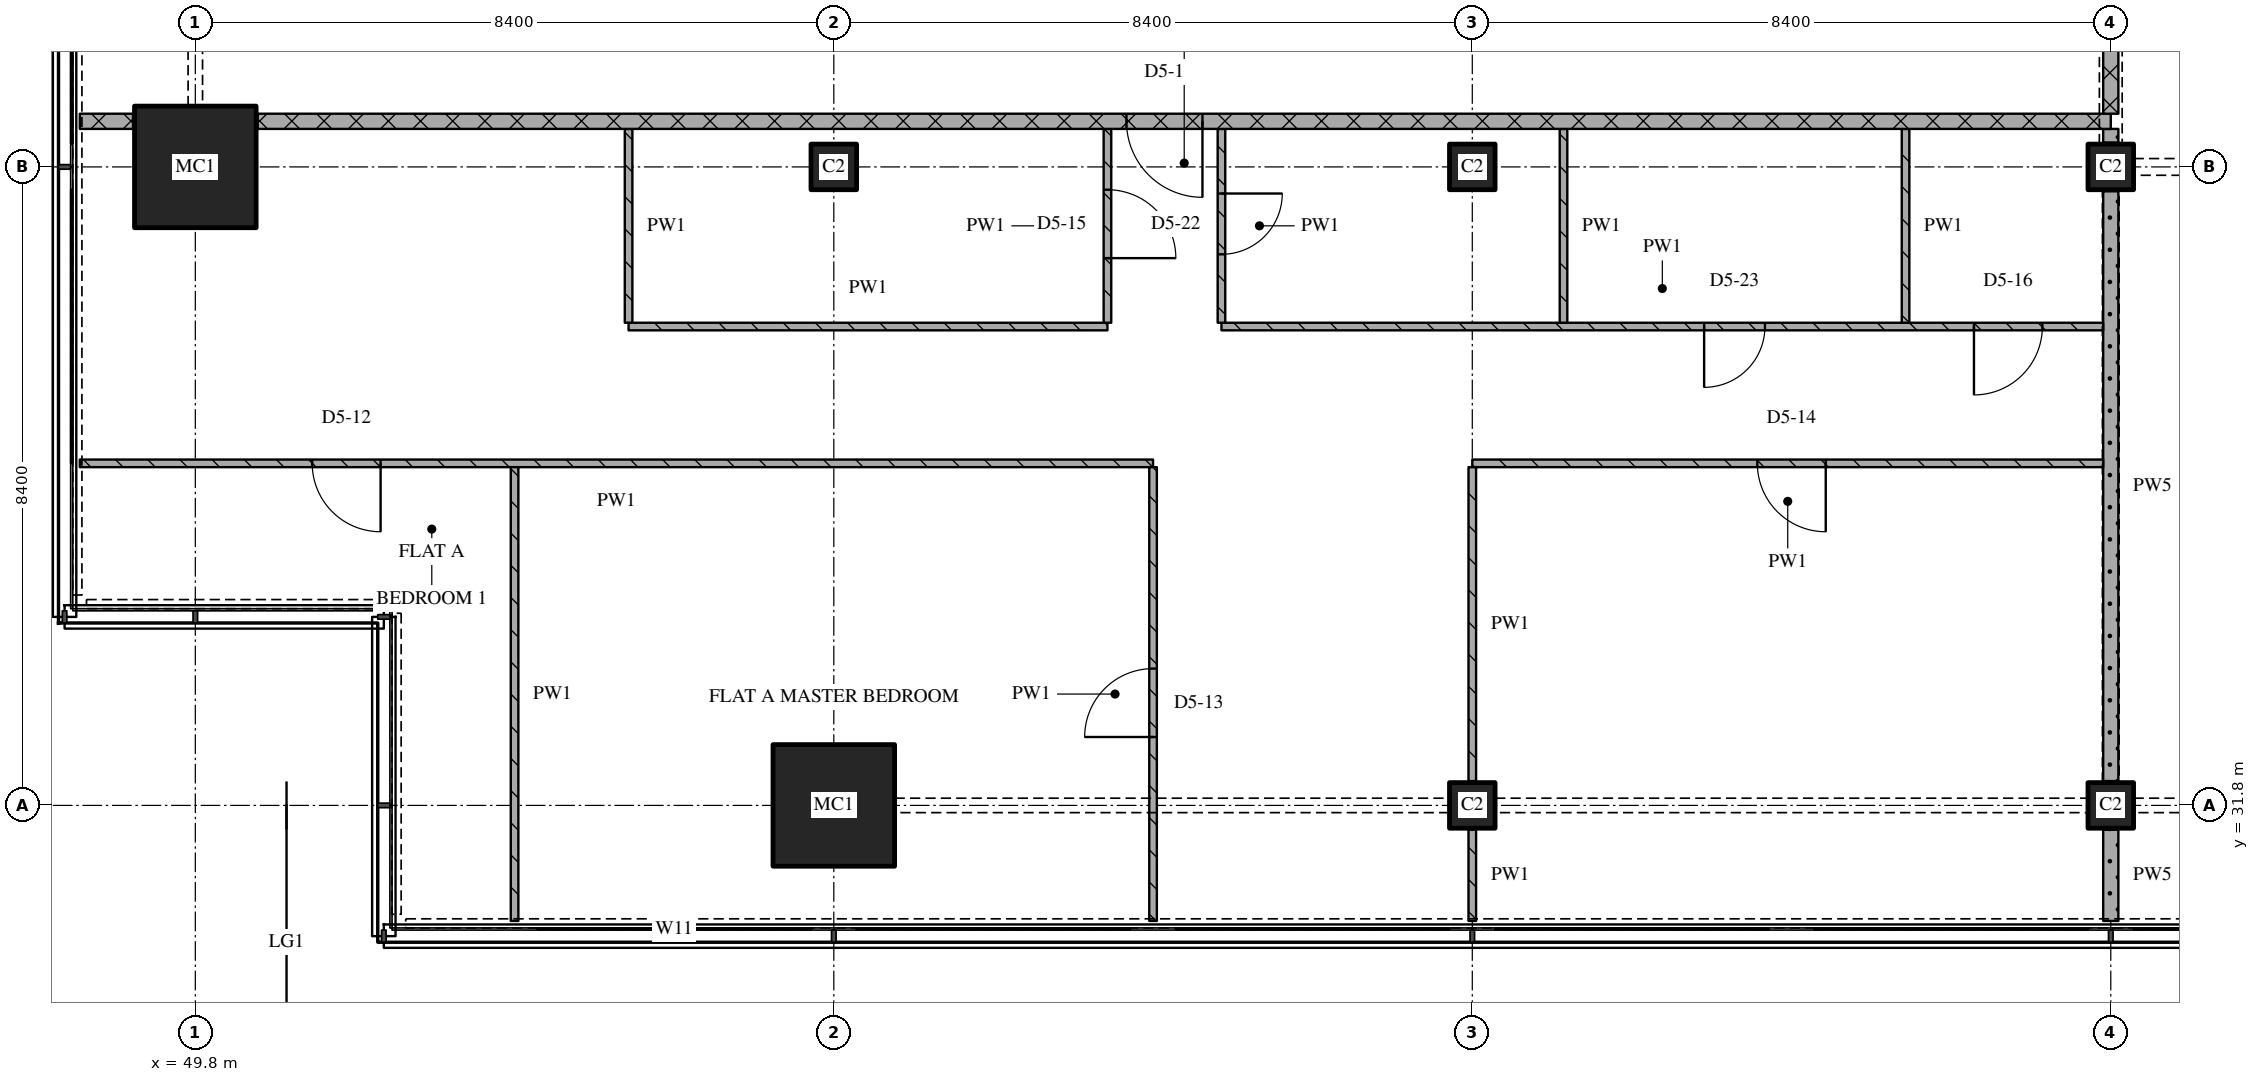
"""IFC4 building model, lengths in metres.
Left out: names, types, materials, properties, quantities, classifications, styles, units other than length and angle.
Written with IfcOpenShell. Run it as: python <this file> out.ifc"""

import sys

from ifc_helpers import new_model, si_unit, direction, frame, frame_2d, origin, origin_2d, place, context, subcontext, project, spatial, rectangle, extrude, element, fill, save


model = new_model("IFC4")
c1 = context("Model", 3, precision=1e-05, world=origin(), true_north=direction((0.0, 1.0)))
c2 = subcontext(c1, "Body", "Model", "MODEL_VIEW")
j1 = project(units=[si_unit("LENGTHUNIT", "METRE"), si_unit("PLANEANGLEUNIT", "RADIAN")], contexts=[c1])
p1 = place(None, origin())
s1 = spatial("IfcSite", under=j1, at=p1, CompositionType="ELEMENT")
p2 = place(p1, origin())
s2 = spatial("IfcBuilding", under=s1, at=p2, CompositionType="ELEMENT")
p3 = place(p2, frame((0.0, 0.0, 248.7)))
s3 = spatial("IfcBuildingStorey", under=s2, at=p3, CompositionType="ELEMENT", Elevation=248.7)
for number, where, z_axis, x_axis in (
    (1, (49.8, 40.2, 0.0), (0.0, 0.0, 1.0), (1.0, 0.0, 0.0)),
    (2, (58.2, 31.8, 0.0), (0.0, 0.0, 1.0), (1.0, 0.0, 0.0)),
):
    element("IfcColumn", number, at=place(p3, frame(where, z_axis=z_axis, x_axis=x_axis)), inside=s3, PredefinedType="COLUMN", context=c2, shape_type="SweptSolid", body=[
        extrude(rectangle(XDim=1.6, YDim=1.6, at=origin_2d()), origin(), (0.0, 0.0, 1.0), 3.6),
    ])
for number, where, z_axis, x_axis in (
    (3, (58.2, 40.2, 0.0), (0.0, 0.0, 1.0), (1.0, 0.0, 0.0)),
    (4, (66.6, 31.8, 0.0), (0.0, 0.0, 1.0), (1.0, 0.0, 0.0)),
    (5, (66.6, 40.2, 0.0), (0.0, 0.0, 1.0), (1.0, 0.0, 0.0)),
    (6, (75.0, 31.8, 0.0), (0.0, 0.0, 1.0), (1.0, 0.0, 0.0)),
    (7, (75.0, 40.2, 0.0), (0.0, 0.0, 1.0), (1.0, 0.0, 0.0)),
):
    element("IfcColumn", number, at=place(p3, frame(where, z_axis=z_axis, x_axis=x_axis)), inside=s3, PredefinedType="COLUMN", context=c2, shape_type="SweptSolid", body=[
        extrude(rectangle(XDim=0.6, YDim=0.6, at=origin_2d()), origin(), (0.0, 0.0, 1.0), 3.6),
    ])
p4 = place(p3, frame((62.4, 36.3, 0.0), z_axis=(0.0, 0.0, 1.0), x_axis=(-1.0, 0.0, 0.0)))
e8 = element("IfcWall", 8, at=p4, inside=s3, PredefinedType="PARTITIONING", context=c2, shape_type="SweptSolid", body=[
    extrude(rectangle(XDim=14.12, YDim=0.1, at=frame_2d((7.06, 0.0))), origin(), (0.0, 0.0, 1.0), 3.3),
])
p5 = place(p4, frame((10.163, 0.0, 0.0)))
e9 = element("IfcOpeningElement", 9, at=p5, cuts=e8, PredefinedType="OPENING", context=c2, shape_type="SweptSolid", body=[
    extrude(rectangle(XDim=0.9, YDim=2.1, at=frame_2d((0.45, 1.05))), frame((0.0, 0.06, 0.0), z_axis=(0.0, -1.0, 0.0), x_axis=(1.0, 0.0, 0.0)), (0.0, 0.0, 1.0), 0.12),
])
p6 = place(p3, frame((74.9, 36.3, 0.0), z_axis=(0.0, 0.0, 1.0), x_axis=(-1.0, 0.0, 0.0)))
e10 = element("IfcWall", 10, at=p6, inside=s3, PredefinedType="PARTITIONING", context=c2, shape_type="SweptSolid", body=[
    extrude(rectangle(XDim=8.3, YDim=0.1, at=frame_2d((4.15, 0.0))), origin(), (0.0, 0.0, 1.0), 3.3),
])
p7 = place(p6, frame((3.65, 0.0, 0.0)))
e11 = element("IfcOpeningElement", 11, at=p7, cuts=e10, PredefinedType="OPENING", context=c2, shape_type="SweptSolid", body=[
    extrude(rectangle(XDim=0.9, YDim=2.1, at=frame_2d((0.45, 1.05))), frame((0.0, 0.06, 0.0), z_axis=(0.0, -1.0, 0.0), x_axis=(1.0, 0.0, 0.0)), (0.0, 0.0, 1.0), 0.12),
])
p8 = place(p3, frame((55.5, 38.1, 0.0), z_axis=(0.0, 0.0, 1.0), x_axis=(1.0, 0.0, 0.0)))
e12 = element("IfcWall", 12, at=p8, inside=s3, PredefinedType="PARTITIONING", context=c2, shape_type="SweptSolid", body=[
    extrude(rectangle(XDim=6.3, YDim=0.1, at=frame_2d((3.15, 0.0))), origin(), (0.0, 0.0, 1.0), 3.3),
])
p9 = place(p3, frame((63.3, 38.1, 0.0), z_axis=(0.0, 0.0, 1.0), x_axis=(1.0, 0.0, 0.0)))
e13 = element("IfcWall", 13, at=p9, inside=s3, PredefinedType="PARTITIONING", context=c2, shape_type="SweptSolid", body=[
    extrude(rectangle(XDim=11.6, YDim=0.1, at=frame_2d((5.8, 0.0))), origin(), (0.0, 0.0, 1.0), 3.3),
])
p10 = place(p9, frame((6.35, 0.0, 0.0)))
e14 = element("IfcOpeningElement", 14, at=p10, cuts=e13, PredefinedType="OPENING", context=c2, shape_type="SweptSolid", body=[
    extrude(rectangle(XDim=0.8, YDim=2.1, at=frame_2d((0.4, 1.05))), frame((0.0, 0.06, 0.0), z_axis=(0.0, -1.0, 0.0), x_axis=(1.0, 0.0, 0.0)), (0.0, 0.0, 1.0), 0.12),
])
p11 = place(p9, frame((9.9, 0.0, 0.0)))
e15 = element("IfcOpeningElement", 15, at=p11, cuts=e13, PredefinedType="OPENING", context=c2, shape_type="SweptSolid", body=[
    extrude(rectangle(XDim=0.9, YDim=2.1, at=frame_2d((0.45, 1.05))), frame((0.0, 0.06, 0.0), z_axis=(0.0, -1.0, 0.0), x_axis=(1.0, 0.0, 0.0)), (0.0, 0.0, 1.0), 0.12),
])
p12 = place(p3, frame((48.28, 40.8, 0.0), z_axis=(0.0, 0.0, 1.0), x_axis=(1.0, 0.0, 0.0)))
e16 = element("IfcWall", 16, at=p12, inside=s3, PredefinedType="PARTITIONING", context=c2, shape_type="SweptSolid", body=[
    extrude(rectangle(XDim=0.7, YDim=0.2, at=frame_2d((0.35, 0.0))), origin(), (0.0, 0.0, 1.0), 3.3),
])
p13 = place(p3, frame((75.0, 40.8, 0.0), z_axis=(0.0, 0.0, 1.0), x_axis=(-1.0, 0.0, 0.0)))
e17 = element("IfcWall", 17, at=p13, inside=s3, PredefinedType="PARTITIONING", context=c2, shape_type="SweptSolid", body=[
    extrude(rectangle(XDim=24.38, YDim=0.2, at=frame_2d((12.19, 0.0))), origin(), (0.0, 0.0, 1.0), 3.3),
])
p14 = place(p13, frame((11.95, 0.0, 0.0)))
e18 = element("IfcOpeningElement", 18, at=p14, cuts=e17, PredefinedType="OPENING", context=c2, shape_type="SweptSolid", body=[
    extrude(rectangle(XDim=1.0, YDim=2.1, at=frame_2d((0.5, 1.05))), frame((0.0, 0.11, 0.0), z_axis=(0.0, -1.0, 0.0), x_axis=(1.0, 0.0, 0.0)), (0.0, 0.0, 1.0), 0.22),
])
p15 = place(p3, frame((54.0, 36.25, 0.0), z_axis=(0.0, 0.0, 1.0), x_axis=(0.0, -1.0, 0.0)))
e19 = element("IfcWall", 19, at=p15, inside=s3, PredefinedType="PARTITIONING", context=c2, shape_type="SweptSolid", body=[
    extrude(rectangle(XDim=5.97, YDim=0.1, at=frame_2d((2.985, 0.0))), origin(), (0.0, 0.0, 1.0), 3.3),
])
p16 = place(p3, frame((55.5, 40.7, 0.0), z_axis=(0.0, 0.0, 1.0), x_axis=(0.0, -1.0, 0.0)))
e20 = element("IfcWall", 20, at=p16, inside=s3, PredefinedType="PARTITIONING", context=c2, shape_type="SweptSolid", body=[
    extrude(rectangle(XDim=2.55, YDim=0.1, at=frame_2d((1.275, 0.0))), origin(), (0.0, 0.0, 1.0), 3.3),
])
p17 = place(p3, frame((61.8, 38.15, 0.0), z_axis=(0.0, 0.0, 1.0), x_axis=(0.0, 1.0, 0.0)))
e21 = element("IfcWall", 21, at=p17, inside=s3, PredefinedType="PARTITIONING", context=c2, shape_type="SweptSolid", body=[
    extrude(rectangle(XDim=2.55, YDim=0.1, at=frame_2d((1.275, 0.0))), origin(), (0.0, 0.0, 1.0), 3.3),
])
p18 = place(p17, frame((0.85, 0.0, 0.0)))
e22 = element("IfcOpeningElement", 22, at=p18, cuts=e21, PredefinedType="OPENING", context=c2, shape_type="SweptSolid", body=[
    extrude(rectangle(XDim=0.9, YDim=2.1, at=frame_2d((0.45, 1.05))), frame((0.0, 0.06, 0.0), z_axis=(0.0, -1.0, 0.0), x_axis=(1.0, 0.0, 0.0)), (0.0, 0.0, 1.0), 0.12),
])
p19 = place(p3, frame((62.4, 30.28, 0.0), z_axis=(0.0, 0.0, 1.0), x_axis=(0.0, 1.0, 0.0)))
e23 = element("IfcWall", 23, at=p19, inside=s3, PredefinedType="PARTITIONING", context=c2, shape_type="SweptSolid", body=[
    extrude(rectangle(XDim=5.97, YDim=0.1, at=frame_2d((2.985, 0.0))), origin(), (0.0, 0.0, 1.0), 3.3),
])
p20 = place(p19, frame((2.42, 0.0, 0.0)))
e24 = element("IfcOpeningElement", 24, at=p20, cuts=e23, PredefinedType="OPENING", context=c2, shape_type="SweptSolid", body=[
    extrude(rectangle(XDim=0.9, YDim=2.1, at=frame_2d((0.45, 1.05))), frame((0.0, 0.06, 0.0), z_axis=(0.0, -1.0, 0.0), x_axis=(1.0, 0.0, 0.0)), (0.0, 0.0, 1.0), 0.12),
])
p21 = place(p3, frame((63.3, 40.7, 0.0), z_axis=(0.0, 0.0, 1.0), x_axis=(0.0, -1.0, 0.0)))
e25 = element("IfcWall", 25, at=p21, inside=s3, PredefinedType="PARTITIONING", context=c2, shape_type="SweptSolid", body=[
    extrude(rectangle(XDim=2.55, YDim=0.1, at=frame_2d((1.275, 0.0))), origin(), (0.0, 0.0, 1.0), 3.3),
])
p22 = place(p21, frame((0.85, 0.0, 0.0)))
e26 = element("IfcOpeningElement", 26, at=p22, cuts=e25, PredefinedType="OPENING", context=c2, shape_type="SweptSolid", body=[
    extrude(rectangle(XDim=0.8, YDim=2.1, at=frame_2d((0.4, 1.05))), frame((0.0, 0.06, 0.0), z_axis=(0.0, -1.0, 0.0), x_axis=(1.0, 0.0, 0.0)), (0.0, 0.0, 1.0), 0.12),
])
p23 = place(p3, frame((66.6, 31.48, 0.0), z_axis=(0.0, 0.0, 1.0), x_axis=(0.0, -1.0, 0.0)))
e27 = element("IfcWall", 27, at=p23, inside=s3, PredefinedType="PARTITIONING", context=c2, shape_type="SweptSolid", body=[
    extrude(rectangle(XDim=1.2, YDim=0.1, at=frame_2d((0.6, 0.0))), origin(), (0.0, 0.0, 1.0), 3.3),
])
p24 = place(p3, frame((66.6, 36.25, 0.0), z_axis=(0.0, 0.0, 1.0), x_axis=(0.0, -1.0, 0.0)))
e28 = element("IfcWall", 28, at=p24, inside=s3, PredefinedType="PARTITIONING", context=c2, shape_type="SweptSolid", body=[
    extrude(rectangle(XDim=4.13, YDim=0.1, at=frame_2d((2.065, 0.0))), origin(), (0.0, 0.0, 1.0), 3.3),
])
for number, where, z_axis, x_axis in (
    (29, (67.8, 40.7, 0.0), (0.0, 0.0, 1.0), (0.0, -1.0, 0.0)),
    (30, (72.3, 40.7, 0.0), (0.0, 0.0, 1.0), (0.0, -1.0, 0.0)),
):
    element("IfcWall", number, at=place(p3, frame(where, z_axis=z_axis, x_axis=x_axis)), inside=s3, PredefinedType="PARTITIONING", context=c2, shape_type="SweptSolid", body=[
        extrude(rectangle(XDim=2.55, YDim=0.1, at=frame_2d((1.275, 0.0))), origin(), (0.0, 0.0, 1.0), 3.3),
    ])
p25 = place(p3, frame((75.0, 43.1, 0.0), z_axis=(0.0, 0.0, 1.0), x_axis=(0.0, -1.0, 0.0)))
e31 = element("IfcWall", 31, at=p25, inside=s3, PredefinedType="PARTITIONING", context=c2, shape_type="SweptSolid", body=[
    extrude(rectangle(XDim=2.2, YDim=0.2, at=frame_2d((1.1, 0.0))), origin(), (0.0, 0.0, 1.0), 2.51),
])
p26 = place(p3, frame((75.0, 31.48, 0.0), z_axis=(0.0, 0.0, 1.0), x_axis=(0.0, -1.0, 0.0)))
e32 = element("IfcWall", 32, at=p26, inside=s3, PredefinedType="PARTITIONING", context=c2, shape_type="SweptSolid", body=[
    extrude(rectangle(XDim=1.2, YDim=0.2, at=frame_2d((0.6, 0.0))), origin(), (0.0, 0.0, 1.0), 2.41),
])
p27 = place(p3, frame((75.0, 39.88, 0.0), z_axis=(0.0, 0.0, 1.0), x_axis=(0.0, -1.0, 0.0)))
e33 = element("IfcWall", 33, at=p27, inside=s3, PredefinedType="PARTITIONING", context=c2, shape_type="SweptSolid", body=[
    extrude(rectangle(XDim=7.76, YDim=0.2, at=frame_2d((3.88, 0.0))), origin(), (0.0, 0.0, 1.0), 2.7),
])
p28 = place(p3, frame((75.0, 40.7, 0.0), z_axis=(0.0, 0.0, 1.0), x_axis=(0.0, -1.0, 0.0)))
e34 = element("IfcWall", 34, at=p28, inside=s3, PredefinedType="PARTITIONING", context=c2, shape_type="SweptSolid", body=[
    extrude(rectangle(XDim=0.18, YDim=0.2, at=frame_2d((0.09, 0.0))), origin(), (0.0, 0.0, 1.0), 3.3),
])
p29 = place(p5, origin())
e35 = element("IfcDoor", 35, at=p29, inside=s3, OperationType="SINGLE_SWING_LEFT", PredefinedType="DOOR", context=c2, shape_type="SweptSolid", body=[
    extrude(rectangle(XDim=0.9, YDim=2.1, at=frame_2d((0.45, 1.05))), frame((0.0, 0.025, 0.0), z_axis=(0.0, -1.0, 0.0), x_axis=(1.0, 0.0, 0.0)), (0.0, 0.0, 1.0), 0.05),
])
fill(e9, e35)
p30 = place(p7, origin())
e36 = element("IfcDoor", 36, at=p30, inside=s3, OperationType="SINGLE_SWING_LEFT", PredefinedType="DOOR", context=c2, shape_type="SweptSolid", body=[
    extrude(rectangle(XDim=0.9, YDim=2.1, at=frame_2d((0.45, 1.05))), frame((0.0, 0.025, 0.0), z_axis=(0.0, -1.0, 0.0), x_axis=(1.0, 0.0, 0.0)), (0.0, 0.0, 1.0), 0.05),
])
fill(e11, e36)
p31 = place(p10, origin())
e37 = element("IfcDoor", 37, at=p31, inside=s3, OperationType="SINGLE_SWING_RIGHT", PredefinedType="DOOR", context=c2, shape_type="SweptSolid", body=[
    extrude(rectangle(XDim=0.8, YDim=2.1, at=frame_2d((0.4, 1.05))), frame((0.0, 0.025, 0.0), z_axis=(0.0, -1.0, 0.0), x_axis=(1.0, 0.0, 0.0)), (0.0, 0.0, 1.0), 0.05),
])
fill(e14, e37)
p32 = place(p11, origin())
e38 = element("IfcDoor", 38, at=p32, inside=s3, OperationType="SINGLE_SWING_RIGHT", PredefinedType="DOOR", context=c2, shape_type="SweptSolid", body=[
    extrude(rectangle(XDim=0.9, YDim=2.1, at=frame_2d((0.45, 1.05))), frame((0.0, 0.025, 0.0), z_axis=(0.0, -1.0, 0.0), x_axis=(1.0, 0.0, 0.0)), (0.0, 0.0, 1.0), 0.05),
])
fill(e15, e38)
p33 = place(p14, origin())
e39 = element("IfcDoor", 39, at=p33, inside=s3, OperationType="SINGLE_SWING_LEFT", PredefinedType="DOOR", context=c2, shape_type="SweptSolid", body=[
    extrude(rectangle(XDim=1.0, YDim=2.1, at=frame_2d((0.5, 1.05))), frame((0.0, 0.025, 0.0), z_axis=(0.0, -1.0, 0.0), x_axis=(1.0, 0.0, 0.0)), (0.0, 0.0, 1.0), 0.05),
])
fill(e18, e39)
p34 = place(p18, origin())
e40 = element("IfcDoor", 40, at=p34, inside=s3, OperationType="SINGLE_SWING_RIGHT", PredefinedType="DOOR", context=c2, shape_type="SweptSolid", body=[
    extrude(rectangle(XDim=0.9, YDim=2.1, at=frame_2d((0.45, 1.05))), frame((0.0, 0.025, 0.0), z_axis=(0.0, -1.0, 0.0), x_axis=(1.0, 0.0, 0.0)), (0.0, 0.0, 1.0), 0.05),
])
fill(e22, e40)
p35 = place(p20, origin())
e41 = element("IfcDoor", 41, at=p35, inside=s3, OperationType="SINGLE_SWING_LEFT", PredefinedType="DOOR", context=c2, shape_type="SweptSolid", body=[
    extrude(rectangle(XDim=0.9, YDim=2.1, at=frame_2d((0.45, 1.05))), frame((0.0, 0.025, 0.0), z_axis=(0.0, -1.0, 0.0), x_axis=(1.0, 0.0, 0.0)), (0.0, 0.0, 1.0), 0.05),
])
fill(e24, e41)
p36 = place(p22, origin())
e42 = element("IfcDoor", 42, at=p36, inside=s3, OperationType="SINGLE_SWING_LEFT", PredefinedType="DOOR", context=c2, shape_type="SweptSolid", body=[
    extrude(rectangle(XDim=0.8, YDim=2.1, at=frame_2d((0.4, 1.05))), frame((0.0, 0.025, 0.0), z_axis=(0.0, -1.0, 0.0), x_axis=(1.0, 0.0, 0.0)), (0.0, 0.0, 1.0), 0.05),
])
fill(e26, e42)
save(model, sys.argv[1])
